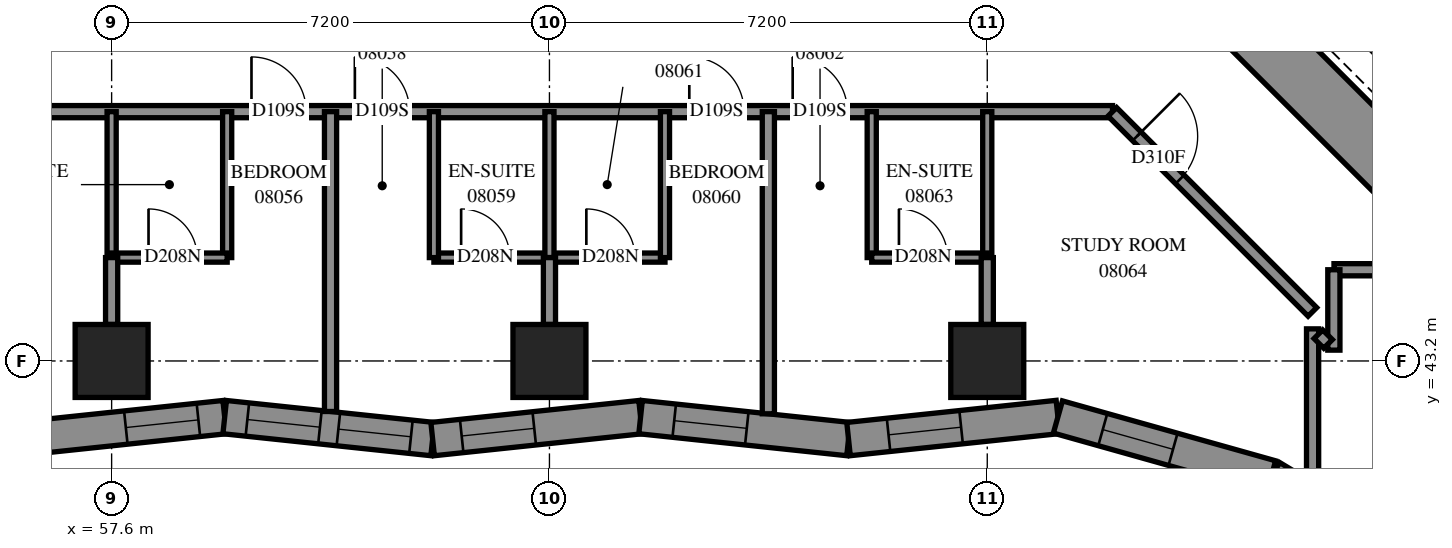
"""IFC4 building model, lengths in metres.
Left out: names, types, materials, properties, quantities, classifications, styles, units other than length and angle.
Written with IfcOpenShell. Run it as: python <this file> out.ifc"""

import sys

from ifc_helpers import new_model, si_unit, direction, frame, frame_2d, origin, origin_2d, place, context, subcontext, project, spatial, polyline, rectangle, outline, extrude, element, fill, save


model = new_model("IFC4")
c1 = context("Model", 3, precision=1e-05, world=origin(), true_north=direction((0.0, 1.0)))
c2 = subcontext(c1, "Body", "Model", "MODEL_VIEW")
j1 = project(units=[si_unit("LENGTHUNIT", "METRE"), si_unit("PLANEANGLEUNIT", "RADIAN")], contexts=[c1])
p1 = place(None, origin())
s1 = spatial("IfcSite", under=j1, at=p1, CompositionType="ELEMENT")
p2 = place(p1, origin())
s2 = spatial("IfcBuilding", under=s1, at=p2, CompositionType="ELEMENT")
p3 = place(p2, frame((0.0, 0.0, 33.8)))
s3 = spatial("IfcBuildingStorey", under=s2, at=p3, CompositionType="ELEMENT", Elevation=33.8)
for number, where, z_axis, x_axis in (
    (1, (57.6, 43.2, 0.0), (0.0, 0.0, 1.0), (1.0, 0.0, 0.0)),
    (2, (64.8, 43.2, 0.0), (0.0, 0.0, 1.0), (1.0, 0.0, 0.0)),
    (3, (72.0, 43.2, 0.0), (0.0, 0.0, 1.0), (1.0, 0.0, 0.0)),
):
    element("IfcColumn", number, at=place(p3, frame(where, z_axis=z_axis, x_axis=x_axis)), inside=s3, PredefinedType="COLUMN", context=c2, shape_type="SweptSolid", body=[
        extrude(rectangle(XDim=1.2, YDim=1.2, at=origin_2d()), origin(), (0.0, 0.0, 1.0), 3.1),
    ])
p4 = place(p3, frame((75.594, 49.443, -0.3), z_axis=(0.0, 0.0, 1.0), x_axis=(0.7071037324, -0.70710983, 0.0)))
e4 = element("IfcWall", 4, at=p4, inside=s3, PredefinedType="SHEAR", context=c2, shape_type="SweptSolid", body=[
    extrude(rectangle(XDim=16.4, YDim=1.0, at=frame_2d((8.2, 0.0))), origin(), (0.0, 0.0, 1.0), 2.7),
])
p5 = place(p3, frame((56.039, 41.916, 0.0), z_axis=(0.0, 0.0, 1.0), x_axis=(0.9944741767, 0.1049814831, 0.0)))
e5 = element("IfcWall", 5, at=p5, inside=s3, PredefinedType="SOLIDWALL", context=c2, shape_type="SweptSolid", body=[
    extrude(outline(polyline([(-0.029, -0.275), (3.41, -0.275), (3.468, 0.275), (0.029, 0.275), (-0.029, -0.275)])), origin(), (0.0, 0.0, 1.0), 3.1),
])
p6 = place(p5, frame((1.804, 0.0, 0.5)))
e6 = element("IfcOpeningElement", 6, at=p6, cuts=e5, PredefinedType="OPENING", context=c2, shape_type="SweptSolid", body=[
    extrude(rectangle(XDim=1.2, YDim=2.45, at=frame_2d((0.6, 1.225))), frame((0.0, 0.285, 0.0), z_axis=(0.0, -1.0, 0.0), x_axis=(1.0, 0.0, 0.0)), (0.0, 0.0, 1.0), 0.57),
])
p7 = place(p3, frame((59.459, 42.276, 0.0), z_axis=(0.0, 0.0, 1.0), x_axis=(0.9944741767, -0.1049814831, 0.0)))
e7 = element("IfcWall", 7, at=p7, inside=s3, PredefinedType="SOLIDWALL", context=c2, shape_type="SweptSolid", body=[
    extrude(outline(polyline([(0.029, -0.275), (3.468, -0.275), (3.41, 0.275), (-0.029, 0.275), (0.029, -0.275)])), origin(), (0.0, 0.0, 1.0), 3.1),
])
p8 = place(p7, frame((0.375, 0.0, 0.5)))
e8 = element("IfcOpeningElement", 8, at=p8, cuts=e7, PredefinedType="OPENING", context=c2, shape_type="SweptSolid", body=[
    extrude(rectangle(XDim=1.2, YDim=2.45, at=frame_2d((0.6, 1.225))), frame((0.0, 0.285, 0.0), z_axis=(0.0, -1.0, 0.0), x_axis=(1.0, 0.0, 0.0)), (0.0, 0.0, 1.0), 0.57),
])
p9 = place(p7, frame((1.88, 0.0, 0.5)))
e9 = element("IfcOpeningElement", 9, at=p9, cuts=e7, PredefinedType="OPENING", context=c2, shape_type="SweptSolid", body=[
    extrude(rectangle(XDim=1.2, YDim=2.45, at=frame_2d((0.6, 1.225))), frame((0.0, 0.285, 0.0), z_axis=(0.0, -1.0, 0.0), x_axis=(1.0, 0.0, 0.0)), (0.0, 0.0, 1.0), 0.57),
])
p10 = place(p3, frame((62.879, 41.916, 0.0), z_axis=(0.0, 0.0, 1.0), x_axis=(0.9944744972, 0.1049784471, 0.0)))
e10 = element("IfcWall", 10, at=p10, inside=s3, PredefinedType="SOLIDWALL", context=c2, shape_type="SweptSolid", body=[
    extrude(outline(polyline([(-0.029, -0.275), (3.41, -0.275), (3.468, 0.275), (0.029, 0.275), (-0.029, -0.275)])), origin(), (0.0, 0.0, 1.0), 3.1),
])
p11 = place(p10, frame((0.48, 0.0, 0.5)))
e11 = element("IfcOpeningElement", 11, at=p11, cuts=e10, PredefinedType="OPENING", context=c2, shape_type="SweptSolid", body=[
    extrude(rectangle(XDim=1.2, YDim=2.45, at=frame_2d((0.6, 1.225))), frame((0.0, 0.285, 0.0), z_axis=(0.0, -1.0, 0.0), x_axis=(1.0, 0.0, 0.0)), (0.0, 0.0, 1.0), 0.57),
])
p12 = place(p3, frame((66.299, 42.276, 0.0), z_axis=(0.0, 0.0, 1.0), x_axis=(0.9944741767, -0.1049814831, 0.0)))
e12 = element("IfcWall", 12, at=p12, inside=s3, PredefinedType="SOLIDWALL", context=c2, shape_type="SweptSolid", body=[
    extrude(outline(polyline([(0.029, -0.275), (3.468, -0.275), (3.41, 0.275), (-0.029, 0.275), (0.029, -0.275)])), origin(), (0.0, 0.0, 1.0), 3.1),
])
p13 = place(p12, frame((0.556, 0.0, 0.5)))
e13 = element("IfcOpeningElement", 13, at=p13, cuts=e12, PredefinedType="OPENING", context=c2, shape_type="SweptSolid", body=[
    extrude(rectangle(XDim=1.2, YDim=2.45, at=frame_2d((0.6, 1.225))), frame((0.0, 0.285, 0.0), z_axis=(0.0, -1.0, 0.0), x_axis=(1.0, 0.0, 0.0)), (0.0, 0.0, 1.0), 0.57),
])
p14 = place(p3, frame((69.718, 41.916, 0.0), z_axis=(0.0, 0.0, 1.0), x_axis=(0.9944739153, 0.1049839596, 0.0)))
e14 = element("IfcWall", 14, at=p14, inside=s3, PredefinedType="SOLIDWALL", context=c2, shape_type="SweptSolid", body=[
    extrude(outline(polyline([(-0.029, -0.275), (3.41, -0.275), (3.515, 0.275), (0.029, 0.275), (-0.029, -0.275)])), origin(), (0.0, 0.0, 1.0), 3.1),
])
p15 = place(p14, frame((0.662, 0.0, 0.5)))
e15 = element("IfcOpeningElement", 15, at=p15, cuts=e14, PredefinedType="OPENING", context=c2, shape_type="SweptSolid", body=[
    extrude(rectangle(XDim=1.2, YDim=2.45, at=frame_2d((0.6, 1.225))), frame((0.0, 0.285, 0.0), z_axis=(0.0, -1.0, 0.0), x_axis=(1.0, 0.0, 0.0)), (0.0, 0.0, 1.0), 0.57),
])
p16 = place(p3, frame((73.162, 42.279, 0.0), z_axis=(0.0, 0.0, 1.0), x_axis=(0.9627115194, -0.2705300916, 0.0)))
e16 = element("IfcWall", 16, at=p16, inside=s3, PredefinedType="SOLIDWALL", context=c2, shape_type="SweptSolid", body=[
    extrude(outline(polyline([(0.053, -0.275), (3.605, -0.275), (3.679, 0.275), (-0.053, 0.275), (0.053, -0.275)])), origin(), (0.0, 0.0, 1.0), 3.1),
])
p17 = place(p16, frame((0.766, 0.0, 0.5)))
e17 = element("IfcOpeningElement", 17, at=p17, cuts=e16, PredefinedType="OPENING", context=c2, shape_type="SweptSolid", body=[
    extrude(rectangle(XDim=1.2, YDim=2.45, at=frame_2d((0.6, 1.225))), frame((0.0, 0.285, 0.0), z_axis=(0.0, -1.0, 0.0), x_axis=(1.0, 0.0, 0.0)), (0.0, 0.0, 1.0), 0.57),
])
p18 = place(p3, frame((76.668, 41.294, 0.0), z_axis=(0.0, 0.0, 1.0), x_axis=(0.8564375758, -0.5162505968, 0.0)))
e18 = element("IfcWall", 18, at=p18, inside=s3, PredefinedType="SOLIDWALL", context=c2, shape_type="SweptSolid", body=[
    extrude(outline(polyline([(0.037, -0.275), (4.032, -0.275), (4.125, 0.275), (-0.037, 0.275), (0.037, -0.275)])), origin(), (0.0, 0.0, 1.0), 3.1),
])
p19 = place(p18, frame((0.764, 0.0, 0.5)))
e19 = element("IfcOpeningElement", 19, at=p19, cuts=e18, PredefinedType="OPENING", context=c2, shape_type="SweptSolid", body=[
    extrude(rectangle(XDim=1.2, YDim=2.45, at=frame_2d((0.6, 1.225))), frame((0.0, 0.285, 0.0), z_axis=(0.0, -1.0, 0.0), x_axis=(1.0, 0.0, 0.0)), (0.0, 0.0, 1.0), 0.57),
])
p20 = place(p18, frame((2.204, 0.0, 0.5)))
e20 = element("IfcOpeningElement", 20, at=p20, cuts=e18, PredefinedType="OPENING", context=c2, shape_type="SweptSolid", body=[
    extrude(rectangle(XDim=1.2, YDim=2.45, at=frame_2d((0.6, 1.225))), frame((0.0, 0.285, 0.0), z_axis=(0.0, -1.0, 0.0), x_axis=(1.0, 0.0, 0.0)), (0.0, 0.0, 1.0), 0.57),
])
p21 = place(p3, frame((54.5, 47.3, 0.0), z_axis=(0.0, 0.0, 1.0), x_axis=(1.0, 0.0, 0.0)))
e21 = element("IfcWall", 21, at=p21, inside=s3, PredefinedType="PARTITIONING", context=c2, shape_type="SweptSolid", body=[
    extrude(rectangle(XDim=19.56, YDim=0.2, at=frame_2d((9.78, 0.0))), origin(), (0.0, 0.0, 1.0), 3.1),
])
p22 = place(p21, frame((0.243, 0.0, 0.0)))
e22 = element("IfcOpeningElement", 22, at=p22, cuts=e21, PredefinedType="OPENING", context=c2, shape_type="SweptSolid", body=[
    extrude(rectangle(XDim=1.0, YDim=2.1, at=frame_2d((0.5, 1.05))), frame((0.0, 0.11, 0.0), z_axis=(0.0, -1.0, 0.0), x_axis=(1.0, 0.0, 0.0)), (0.0, 0.0, 1.0), 0.22),
])
p23 = place(p21, frame((5.4, 0.0, 0.0)))
e23 = element("IfcOpeningElement", 23, at=p23, cuts=e21, PredefinedType="OPENING", context=c2, shape_type="SweptSolid", body=[
    extrude(rectangle(XDim=0.9, YDim=2.1, at=frame_2d((0.45, 1.05))), frame((0.0, 0.11, 0.0), z_axis=(0.0, -1.0, 0.0), x_axis=(1.0, 0.0, 0.0)), (0.0, 0.0, 1.0), 0.22),
])
p24 = place(p21, frame((7.1, 0.0, 0.0)))
e24 = element("IfcOpeningElement", 24, at=p24, cuts=e21, PredefinedType="OPENING", context=c2, shape_type="SweptSolid", body=[
    extrude(rectangle(XDim=0.9, YDim=2.1, at=frame_2d((0.45, 1.05))), frame((0.0, 0.11, 0.0), z_axis=(0.0, -1.0, 0.0), x_axis=(1.0, 0.0, 0.0)), (0.0, 0.0, 1.0), 0.22),
])
p25 = place(p21, frame((12.6, 0.0, 0.0)))
e25 = element("IfcOpeningElement", 25, at=p25, cuts=e21, PredefinedType="OPENING", context=c2, shape_type="SweptSolid", body=[
    extrude(rectangle(XDim=0.9, YDim=2.1, at=frame_2d((0.45, 1.05))), frame((0.0, 0.11, 0.0), z_axis=(0.0, -1.0, 0.0), x_axis=(1.0, 0.0, 0.0)), (0.0, 0.0, 1.0), 0.22),
])
p26 = place(p21, frame((14.3, 0.0, 0.0)))
e26 = element("IfcOpeningElement", 26, at=p26, cuts=e21, PredefinedType="OPENING", context=c2, shape_type="SweptSolid", body=[
    extrude(rectangle(XDim=0.9, YDim=2.1, at=frame_2d((0.45, 1.05))), frame((0.0, 0.11, 0.0), z_axis=(0.0, -1.0, 0.0), x_axis=(1.0, 0.0, 0.0)), (0.0, 0.0, 1.0), 0.22),
])
p27 = place(p3, frame((68.4, 42.331, 0.0), z_axis=(0.0, 0.0, 1.0), x_axis=(0.0, 1.0, 0.0)))
e27 = element("IfcWall", 27, at=p27, inside=s3, PredefinedType="PARTITIONING", context=c2, shape_type="SweptSolid", body=[
    extrude(rectangle(XDim=4.969, YDim=0.2, at=frame_2d((2.484, 0.0))), origin(), (0.0, 0.0, 1.0), 3.1),
])
p28 = place(p3, frame((61.2, 42.369, 0.0), z_axis=(0.0, 0.0, 1.0), x_axis=(0.0, 1.0, 0.0)))
e28 = element("IfcWall", 28, at=p28, inside=s3, PredefinedType="PARTITIONING", context=c2, shape_type="SweptSolid", body=[
    extrude(rectangle(XDim=4.931, YDim=0.2, at=frame_2d((2.465, 0.0))), origin(), (0.0, 0.0, 1.0), 3.1),
])
p29 = place(p3, frame((74.057, 47.297, 0.0), z_axis=(0.0, 0.0, 1.0), x_axis=(0.7071067812, -0.7071067812, 0.0)))
e29 = element("IfcWall", 29, at=p29, inside=s3, PredefinedType="PARTITIONING", context=c2, shape_type="SweptSolid", body=[
    extrude(rectangle(XDim=4.653, YDim=0.2, at=frame_2d((2.326, 0.0))), origin(), (0.0, 0.0, 1.0), 3.1),
])
p30 = place(p29, frame((0.57, 0.0, 0.0)))
e30 = element("IfcOpeningElement", 30, at=p30, cuts=e29, PredefinedType="OPENING", context=c2, shape_type="SweptSolid", body=[
    extrude(rectangle(XDim=1.0, YDim=2.1, at=frame_2d((0.5, 1.05))), frame((0.0, 0.11, 0.0), z_axis=(0.0, -1.0, 0.0), x_axis=(1.0, 0.0, 0.0)), (0.0, 0.0, 1.0), 0.22),
])
p31 = place(p3, frame((62.9, 44.9, 0.0), z_axis=(0.0, 0.0, 1.0), x_axis=(1.0, 0.0, 0.0)))
e31 = element("IfcWall", 31, at=p31, inside=s3, PredefinedType="PARTITIONING", context=c2, shape_type="SweptSolid", body=[
    extrude(rectangle(XDim=3.8, YDim=0.15, at=frame_2d((1.9, 0.0))), origin(), (0.0, 0.0, 1.0), 3.1),
])
p32 = place(p31, frame((0.448, 0.0, 0.0)))
e32 = element("IfcOpeningElement", 32, at=p32, cuts=e31, PredefinedType="OPENING", context=c2, shape_type="SweptSolid", body=[
    extrude(rectangle(XDim=0.8, YDim=2.1, at=frame_2d((0.4, 1.05))), frame((0.0, 0.085, 0.0), z_axis=(0.0, -1.0, 0.0), x_axis=(1.0, 0.0, 0.0)), (0.0, 0.0, 1.0), 0.17),
])
p33 = place(p31, frame((2.507, 0.0, 0.0)))
e33 = element("IfcOpeningElement", 33, at=p33, cuts=e31, PredefinedType="OPENING", context=c2, shape_type="SweptSolid", body=[
    extrude(rectangle(XDim=0.8, YDim=2.1, at=frame_2d((0.4, 1.05))), frame((0.0, 0.085, 0.0), z_axis=(0.0, -1.0, 0.0), x_axis=(1.0, 0.0, 0.0)), (0.0, 0.0, 1.0), 0.17),
])
p34 = place(p3, frame((77.35, 41.204, 0.0), z_axis=(0.0, 0.0, 1.0), x_axis=(0.0, 1.0, 0.0)))
e34 = element("IfcWall", 34, at=p34, inside=s3, PredefinedType="PARTITIONING", context=c2, shape_type="SweptSolid", body=[
    extrude(rectangle(XDim=2.524, YDim=0.2, at=frame_2d((1.262, 0.0))), origin(), (0.0, 0.0, 1.0), 3.1),
])
for number, where, z_axis, x_axis in (
    (35, (59.5, 44.9, 0.0), (0.0, 0.0, 1.0), (0.0, 1.0, 0.0)),
    (36, (57.6, 44.9, 0.0), (0.0, 0.0, 1.0), (0.0, 1.0, 0.0)),
    (37, (62.9, 44.9, 0.0), (0.0, 0.0, 1.0), (0.0, 1.0, 0.0)),
    (38, (66.7, 44.9, 0.0), (0.0, 0.0, 1.0), (0.0, 1.0, 0.0)),
    (39, (64.8, 44.9, 0.0), (0.0, 0.0, 1.0), (0.0, 1.0, 0.0)),
    (40, (70.1, 44.9, 0.0), (0.0, 0.0, 1.0), (0.0, 1.0, 0.0)),
    (41, (72.0, 44.9, 0.0), (0.0, 0.0, 1.0), (0.0, 1.0, 0.0)),
):
    element("IfcWall", number, at=place(p3, frame(where, z_axis=z_axis, x_axis=x_axis)), inside=s3, PredefinedType="PARTITIONING", context=c2, shape_type="SweptSolid", body=[
        extrude(rectangle(XDim=2.4, YDim=0.15, at=frame_2d((1.2, 0.0))), origin(), (0.0, 0.0, 1.0), 3.1),
    ])
p35 = place(p3, frame((70.1, 44.9, 0.0), z_axis=(0.0, 0.0, 1.0), x_axis=(1.0, 0.0, 0.0)))
e42 = element("IfcWall", 42, at=p35, inside=s3, PredefinedType="PARTITIONING", context=c2, shape_type="SweptSolid", body=[
    extrude(rectangle(XDim=1.9, YDim=0.15, at=frame_2d((0.95, 0.0))), origin(), (0.0, 0.0, 1.0), 3.1),
])
p36 = place(p35, frame((0.448, 0.0, 0.0)))
e43 = element("IfcOpeningElement", 43, at=p36, cuts=e42, PredefinedType="OPENING", context=c2, shape_type="SweptSolid", body=[
    extrude(rectangle(XDim=0.8, YDim=2.1, at=frame_2d((0.4, 1.05))), frame((0.0, 0.085, 0.0), z_axis=(0.0, -1.0, 0.0), x_axis=(1.0, 0.0, 0.0)), (0.0, 0.0, 1.0), 0.17),
])
p37 = place(p3, frame((57.6, 44.9, 0.0), z_axis=(0.0, 0.0, 1.0), x_axis=(1.0, 0.0, 0.0)))
e44 = element("IfcWall", 44, at=p37, inside=s3, PredefinedType="PARTITIONING", context=c2, shape_type="SweptSolid", body=[
    extrude(rectangle(XDim=1.9, YDim=0.15, at=frame_2d((0.95, 0.0))), origin(), (0.0, 0.0, 1.0), 3.1),
])
p38 = place(p37, frame((0.607, 0.0, 0.0)))
e45 = element("IfcOpeningElement", 45, at=p38, cuts=e44, PredefinedType="OPENING", context=c2, shape_type="SweptSolid", body=[
    extrude(rectangle(XDim=0.8, YDim=2.1, at=frame_2d((0.4, 1.05))), frame((0.0, 0.085, 0.0), z_axis=(0.0, -1.0, 0.0), x_axis=(1.0, 0.0, 0.0)), (0.0, 0.0, 1.0), 0.17),
])
p39 = place(p3, frame((77.702, 44.7, 0.0), z_axis=(0.0, 0.0, 1.0), x_axis=(1.0, 0.0, 0.0)))
e46 = element("IfcWall", 46, at=p39, inside=s3, PredefinedType="PARTITIONING", context=c2, shape_type="SweptSolid", body=[
    extrude(rectangle(XDim=1.814, YDim=0.2, at=frame_2d((0.907, 0.0))), origin(), (0.0, 0.0, 1.0), 3.1),
])
p40 = place(p3, frame((77.7, 43.378, 0.0), z_axis=(0.0, 0.0, 1.0), x_axis=(0.0, 1.0, 0.0)))
e47 = element("IfcWall", 47, at=p40, inside=s3, PredefinedType="PARTITIONING", context=c2, shape_type="SweptSolid", body=[
    extrude(rectangle(XDim=1.322, YDim=0.2, at=frame_2d((0.661, 0.0))), origin(), (0.0, 0.0, 1.0), 3.1),
])
for number, where, z_axis, x_axis in (
    (48, (57.6, 43.8, 0.0), (0.0, 0.0, 1.0), (0.0, 1.0, 0.0)),
    (49, (64.8, 43.8, 0.0), (0.0, 0.0, 1.0), (0.0, 1.0, 0.0)),
    (50, (72.0, 43.8, 0.0), (0.0, 0.0, 1.0), (0.0, 1.0, 0.0)),
):
    element("IfcWall", number, at=place(p3, frame(where, z_axis=z_axis, x_axis=x_axis)), inside=s3, PredefinedType="PARTITIONING", context=c2, shape_type="SweptSolid", body=[
        extrude(rectangle(XDim=1.1, YDim=0.2, at=frame_2d((0.55, 0.0))), origin(), (0.0, 0.0, 1.0), 3.1),
    ])
p41 = place(p3, frame((77.445, 43.64, 0.0), z_axis=(0.0, 0.0, 1.0), x_axis=(0.7071067812, -0.7071067812, 0.0)))
e51 = element("IfcWall", 51, at=p41, inside=s3, PredefinedType="PARTITIONING", context=c2, shape_type="SweptSolid", body=[
    extrude(rectangle(XDim=0.225, YDim=0.2, at=frame_2d((0.113, 0.0))), origin(), (0.0, 0.0, 1.0), 3.1),
])
p42 = place(p6, origin())
e52 = element("IfcWindow", 52, at=p42, inside=s3, PartitioningType="SINGLE_PANEL", PredefinedType="WINDOW", context=c2, shape_type="SweptSolid", body=[
    extrude(rectangle(XDim=1.2, YDim=2.45, at=frame_2d((0.6, 1.225))), frame((0.0, 0.155, 0.0), z_axis=(0.0, -1.0, 0.0), x_axis=(1.0, 0.0, 0.0)), (0.0, 0.0, 1.0), 0.06),
])
fill(e6, e52)
p43 = place(p8, origin())
e53 = element("IfcWindow", 53, at=p43, inside=s3, PartitioningType="SINGLE_PANEL", PredefinedType="WINDOW", context=c2, shape_type="SweptSolid", body=[
    extrude(rectangle(XDim=1.2, YDim=2.45, at=frame_2d((0.6, 1.225))), frame((0.0, 0.155, 0.0), z_axis=(0.0, -1.0, 0.0), x_axis=(1.0, 0.0, 0.0)), (0.0, 0.0, 1.0), 0.06),
])
fill(e8, e53)
p44 = place(p9, origin())
e54 = element("IfcWindow", 54, at=p44, inside=s3, PartitioningType="SINGLE_PANEL", PredefinedType="WINDOW", context=c2, shape_type="SweptSolid", body=[
    extrude(rectangle(XDim=1.2, YDim=2.45, at=frame_2d((0.6, 1.225))), frame((0.0, 0.155, 0.0), z_axis=(0.0, -1.0, 0.0), x_axis=(1.0, 0.0, 0.0)), (0.0, 0.0, 1.0), 0.06),
])
fill(e9, e54)
p45 = place(p11, origin())
e55 = element("IfcWindow", 55, at=p45, inside=s3, PartitioningType="SINGLE_PANEL", PredefinedType="WINDOW", context=c2, shape_type="SweptSolid", body=[
    extrude(rectangle(XDim=1.2, YDim=2.45, at=frame_2d((0.6, 1.225))), frame((0.0, 0.155, 0.0), z_axis=(0.0, -1.0, 0.0), x_axis=(1.0, 0.0, 0.0)), (0.0, 0.0, 1.0), 0.06),
])
fill(e11, e55)
p46 = place(p13, origin())
e56 = element("IfcWindow", 56, at=p46, inside=s3, PartitioningType="SINGLE_PANEL", PredefinedType="WINDOW", context=c2, shape_type="SweptSolid", body=[
    extrude(rectangle(XDim=1.2, YDim=2.45, at=frame_2d((0.6, 1.225))), frame((0.0, 0.155, 0.0), z_axis=(0.0, -1.0, 0.0), x_axis=(1.0, 0.0, 0.0)), (0.0, 0.0, 1.0), 0.06),
])
fill(e13, e56)
p47 = place(p15, origin())
e57 = element("IfcWindow", 57, at=p47, inside=s3, PartitioningType="SINGLE_PANEL", PredefinedType="WINDOW", context=c2, shape_type="SweptSolid", body=[
    extrude(rectangle(XDim=1.2, YDim=2.45, at=frame_2d((0.6, 1.225))), frame((0.0, 0.155, 0.0), z_axis=(0.0, -1.0, 0.0), x_axis=(1.0, 0.0, 0.0)), (0.0, 0.0, 1.0), 0.06),
])
fill(e15, e57)
p48 = place(p17, origin())
e58 = element("IfcWindow", 58, at=p48, inside=s3, PartitioningType="SINGLE_PANEL", PredefinedType="WINDOW", context=c2, shape_type="SweptSolid", body=[
    extrude(rectangle(XDim=1.2, YDim=2.45, at=frame_2d((0.6, 1.225))), frame((0.0, 0.155, 0.0), z_axis=(0.0, -1.0, 0.0), x_axis=(1.0, 0.0, 0.0)), (0.0, 0.0, 1.0), 0.06),
])
fill(e17, e58)
p49 = place(p23, origin())
e59 = element("IfcDoor", 59, at=p49, inside=s3, OperationType="SINGLE_SWING_LEFT", PredefinedType="DOOR", context=c2, shape_type="SweptSolid", body=[
    extrude(rectangle(XDim=0.9, YDim=2.1, at=frame_2d((0.45, 1.05))), frame((0.0, 0.025, 0.0), z_axis=(0.0, -1.0, 0.0), x_axis=(1.0, 0.0, 0.0)), (0.0, 0.0, 1.0), 0.05),
])
fill(e23, e59)
p50 = place(p38, origin())
e60 = element("IfcDoor", 60, at=p50, inside=s3, OperationType="SINGLE_SWING_RIGHT", PredefinedType="DOOR", context=c2, shape_type="SweptSolid", body=[
    extrude(rectangle(XDim=0.8, YDim=2.1, at=frame_2d((0.4, 1.05))), frame((0.0, 0.025, 0.0), z_axis=(0.0, -1.0, 0.0), x_axis=(1.0, 0.0, 0.0)), (0.0, 0.0, 1.0), 0.05),
])
fill(e45, e60)
p51 = place(p24, origin())
e61 = element("IfcDoor", 61, at=p51, inside=s3, OperationType="SINGLE_SWING_RIGHT", PredefinedType="DOOR", context=c2, shape_type="SweptSolid", body=[
    extrude(rectangle(XDim=0.9, YDim=2.1, at=frame_2d((0.45, 1.05))), frame((0.0, 0.025, 0.0), z_axis=(0.0, -1.0, 0.0), x_axis=(1.0, 0.0, 0.0)), (0.0, 0.0, 1.0), 0.05),
])
fill(e24, e61)
p52 = place(p32, origin())
e62 = element("IfcDoor", 62, at=p52, inside=s3, OperationType="SINGLE_SWING_RIGHT", PredefinedType="DOOR", context=c2, shape_type="SweptSolid", body=[
    extrude(rectangle(XDim=0.8, YDim=2.1, at=frame_2d((0.4, 1.05))), frame((0.0, 0.025, 0.0), z_axis=(0.0, -1.0, 0.0), x_axis=(1.0, 0.0, 0.0)), (0.0, 0.0, 1.0), 0.05),
])
fill(e32, e62)
p53 = place(p25, origin())
e63 = element("IfcDoor", 63, at=p53, inside=s3, OperationType="SINGLE_SWING_LEFT", PredefinedType="DOOR", context=c2, shape_type="SweptSolid", body=[
    extrude(rectangle(XDim=0.9, YDim=2.1, at=frame_2d((0.45, 1.05))), frame((0.0, 0.025, 0.0), z_axis=(0.0, -1.0, 0.0), x_axis=(1.0, 0.0, 0.0)), (0.0, 0.0, 1.0), 0.05),
])
fill(e25, e63)
p54 = place(p33, origin())
e64 = element("IfcDoor", 64, at=p54, inside=s3, OperationType="SINGLE_SWING_RIGHT", PredefinedType="DOOR", context=c2, shape_type="SweptSolid", body=[
    extrude(rectangle(XDim=0.8, YDim=2.1, at=frame_2d((0.4, 1.05))), frame((0.0, 0.025, 0.0), z_axis=(0.0, -1.0, 0.0), x_axis=(1.0, 0.0, 0.0)), (0.0, 0.0, 1.0), 0.05),
])
fill(e33, e64)
p55 = place(p26, origin())
e65 = element("IfcDoor", 65, at=p55, inside=s3, OperationType="SINGLE_SWING_RIGHT", PredefinedType="DOOR", context=c2, shape_type="SweptSolid", body=[
    extrude(rectangle(XDim=0.9, YDim=2.1, at=frame_2d((0.45, 1.05))), frame((0.0, 0.025, 0.0), z_axis=(0.0, -1.0, 0.0), x_axis=(1.0, 0.0, 0.0)), (0.0, 0.0, 1.0), 0.05),
])
fill(e26, e65)
p56 = place(p36, origin())
e66 = element("IfcDoor", 66, at=p56, inside=s3, OperationType="SINGLE_SWING_RIGHT", PredefinedType="DOOR", context=c2, shape_type="SweptSolid", body=[
    extrude(rectangle(XDim=0.8, YDim=2.1, at=frame_2d((0.4, 1.05))), frame((0.0, 0.025, 0.0), z_axis=(0.0, -1.0, 0.0), x_axis=(1.0, 0.0, 0.0)), (0.0, 0.0, 1.0), 0.05),
])
fill(e43, e66)
p57 = place(p30, origin())
e67 = element("IfcDoor", 67, at=p57, inside=s3, OperationType="SINGLE_SWING_LEFT", PredefinedType="DOOR", context=c2, shape_type="SweptSolid", body=[
    extrude(rectangle(XDim=1.0, YDim=2.1, at=frame_2d((0.5, 1.05))), frame((0.0, 0.025, 0.0), z_axis=(0.0, -1.0, 0.0), x_axis=(1.0, 0.0, 0.0)), (0.0, 0.0, 1.0), 0.05),
])
fill(e30, e67)
save(model, sys.argv[1])
